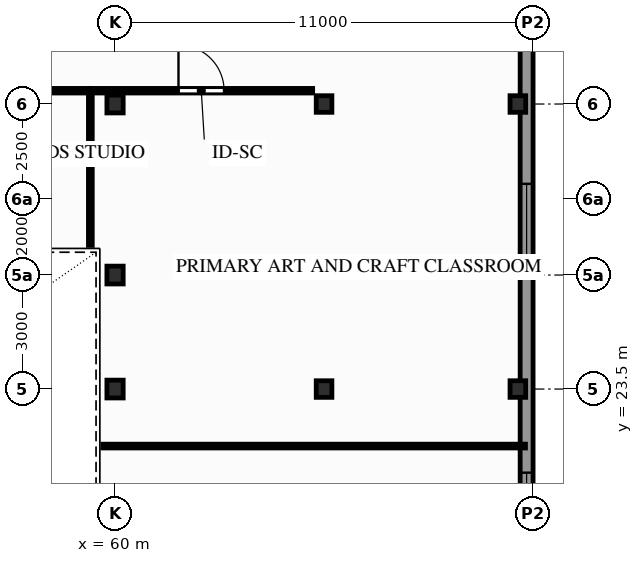
"""IFC4 building model, lengths in metres.
Left out: names, types, materials, properties, quantities, classifications, styles, units other than length and angle.
Written with IfcOpenShell. Run it as: python <this file> out.ifc"""

import sys

from ifc_helpers import new_model, si_unit, direction, frame, frame_2d, origin, origin_2d, place, context, subcontext, project, spatial, rectangle, i_section, extrude, element, fill, save


model = new_model("IFC4")
c1 = context("Model", 3, precision=1e-05, world=origin(), true_north=direction((0.0, 1.0)))
c2 = subcontext(c1, "Body", "Model", "MODEL_VIEW")
j1 = project(units=[si_unit("LENGTHUNIT", "METRE"), si_unit("PLANEANGLEUNIT", "RADIAN")], contexts=[c1])
p1 = place(None, origin())
s1 = spatial("IfcSite", under=j1, at=p1, CompositionType="ELEMENT")
p2 = place(p1, origin())
s2 = spatial("IfcBuilding", under=s1, at=p2, CompositionType="ELEMENT")
p3 = place(p2, frame((0.0, 0.0, 9.0)))
s3 = spatial("IfcBuildingStorey", under=s2, at=p3, CompositionType="ELEMENT", Elevation=9.0)
for number, where, z_axis, x_axis in (
    (1, (60.0, 23.5, 0.0), (0.0, 0.0, 1.0), (1.0, 0.0, 0.0)),
    (2, (60.0, 26.5, 0.0), (0.0, 0.0, 1.0), (1.0, 0.0, 0.0)),
    (3, (60.0, 31.0, 0.0), (0.0, 0.0, 1.0), (1.0, 0.0, 0.0)),
):
    element("IfcColumn", number, at=place(p3, frame(where, z_axis=z_axis, x_axis=x_axis)), inside=s3, PredefinedType="COLUMN", context=c2, shape_type="SweptSolid", body=[
        extrude(i_section(OverallWidth=0.428, OverallDepth=0.469, WebThickness=0.078, FlangeThickness=0.125, FilletRadius=0.015, at=origin_2d()), origin(), (0.0, 0.0, 1.0), 4.5),
    ])
for number, where, z_axis, x_axis in (
    (4, (65.5, 23.5, 0.0), (0.0, 0.0, 1.0), (1.0, 0.0, 0.0)),
    (5, (65.5, 31.0, 0.0), (0.0, 0.0, 1.0), (1.0, 0.0, 0.0)),
    (6, (70.6, 23.5, 0.0), (0.0, 0.0, 1.0), (1.0, 0.0, 0.0)),
    (7, (70.6, 31.0, 0.0), (0.0, 0.0, 1.0), (1.0, 0.0, 0.0)),
):
    element("IfcColumn", number, at=place(p3, frame(where, z_axis=z_axis, x_axis=x_axis)), inside=s3, PredefinedType="COLUMN", context=c2, shape_type="SweptSolid", body=[
        extrude(i_section(OverallWidth=0.412, OverallDepth=0.437, WebThickness=0.036, FlangeThickness=0.058, FilletRadius=0.015, at=origin_2d()), origin(), (0.0, 0.0, 1.0), 4.5),
    ])
p4 = place(p3, frame((70.83, -1.83, 0.0), z_axis=(0.0, 0.0, 1.0), x_axis=(0.0, 1.0, 0.0)))
e8 = element("IfcWall", 8, at=p4, inside=s3, PredefinedType="STANDARD", context=c2, shape_type="SweptSolid", body=[
    extrude(rectangle(XDim=36.43, YDim=0.34, at=frame_2d((18.215, 0.0))), origin(), (0.0, 0.0, 1.0), 3.583),
])
p5 = place(p4, frame((6.33, 0.0, 0.9)))
e9 = element("IfcOpeningElement", 9, at=p5, cuts=e8, PredefinedType="OPENING", context=c2, shape_type="SweptSolid", body=[
    extrude(rectangle(XDim=2.1, YDim=2.05, at=frame_2d((1.05, 1.025))), frame((0.0, 0.18, 0.0), z_axis=(0.0, -1.0, 0.0), x_axis=(1.0, 0.0, 0.0)), (0.0, 0.0, 1.0), 0.36),
])
p6 = place(p4, frame((14.8, 0.0, 0.9)))
e10 = element("IfcOpeningElement", 10, at=p6, cuts=e8, PredefinedType="OPENING", context=c2, shape_type="SweptSolid", body=[
    extrude(rectangle(XDim=2.1, YDim=2.05, at=frame_2d((1.05, 1.025))), frame((0.0, 0.18, 0.0), z_axis=(0.0, -1.0, 0.0), x_axis=(1.0, 0.0, 0.0)), (0.0, 0.0, 1.0), 0.36),
])
p7 = place(p4, frame((21.03, 0.0, 0.9)))
e11 = element("IfcOpeningElement", 11, at=p7, cuts=e8, PredefinedType="OPENING", context=c2, shape_type="SweptSolid", body=[
    extrude(rectangle(XDim=2.1, YDim=2.05, at=frame_2d((1.05, 1.025))), frame((0.0, 0.18, 0.0), z_axis=(0.0, -1.0, 0.0), x_axis=(1.0, 0.0, 0.0)), (0.0, 0.0, 1.0), 0.36),
])
p8 = place(p4, frame((28.63, 0.0, 0.9)))
e12 = element("IfcOpeningElement", 12, at=p8, cuts=e8, PredefinedType="OPENING", context=c2, shape_type="SweptSolid", body=[
    extrude(rectangle(XDim=2.1, YDim=2.05, at=frame_2d((1.05, 1.025))), frame((0.0, 0.18, 0.0), z_axis=(0.0, -1.0, 0.0), x_axis=(1.0, 0.0, 0.0)), (0.0, 0.0, 1.0), 0.36),
])
p9 = place(p3, frame((59.339, 31.35, 0.0), z_axis=(0.0, 0.0, 1.0), x_axis=(1.0, 0.0, 0.0)))
e13 = element("IfcWall", 13, at=p9, inside=s3, PredefinedType="PARTITIONING", context=c2, shape_type="SweptSolid", body=[
    extrude(rectangle(XDim=5.861, YDim=0.12, at=frame_2d((2.931, 0.0))), origin(), (0.0, 0.0, 1.0), 4.22),
])
p10 = place(p9, frame((2.331, 0.0, 0.0)))
e14 = element("IfcOpeningElement", 14, at=p10, cuts=e13, PredefinedType="OPENING", context=c2, shape_type="SweptSolid", body=[
    extrude(rectangle(XDim=1.2, YDim=2.08, at=frame_2d((0.6, 1.04))), frame((0.0, 0.07, 0.0), z_axis=(0.0, -1.0, 0.0), x_axis=(1.0, 0.0, 0.0)), (0.0, 0.0, 1.0), 0.14),
])
p11 = place(p3, frame((38.493, 31.35, 0.0), z_axis=(0.0, 0.0, 1.0), x_axis=(1.0, 0.0, 0.0)))
e15 = element("IfcWall", 15, at=p11, inside=s3, PredefinedType="PARTITIONING", context=c2, shape_type="SweptSolid", body=[
    extrude(rectangle(XDim=20.865, YDim=0.12, at=frame_2d((10.432, 0.0))), origin(), (0.0, 0.0, 1.0), 3.344),
])
p12 = place(p11, frame((10.052, 0.0, 0.0)))
e16 = element("IfcOpeningElement", 16, at=p12, cuts=e15, PredefinedType="OPENING", context=c2, shape_type="SweptSolid", body=[
    extrude(rectangle(XDim=1.2, YDim=2.08, at=frame_2d((0.6, 1.04))), frame((0.0, 0.07, 0.0), z_axis=(0.0, -1.0, 0.0), x_axis=(1.0, 0.0, 0.0)), (0.0, 0.0, 1.0), 0.14),
])
p13 = place(p3, frame((59.68, 22.0, 0.0), z_axis=(0.0, 0.0, 1.0), x_axis=(1.0, 0.0, 0.0)))
e17 = element("IfcWall", 17, at=p13, inside=s3, PredefinedType="PARTITIONING", context=c2, shape_type="SweptSolid", body=[
    extrude(rectangle(XDim=11.12, YDim=0.1, at=frame_2d((5.56, 0.0))), origin(), (0.0, 0.0, 1.0), 3.344),
])
p14 = place(p3, frame((59.35, 27.28, 0.0), z_axis=(0.0, 0.0, 1.0), x_axis=(0.0, 1.0, 0.0)))
e18 = element("IfcWall", 18, at=p14, inside=s3, PredefinedType="PARTITIONING", context=c2, shape_type="SweptSolid", body=[
    extrude(rectangle(XDim=4.066, YDim=0.1, at=frame_2d((2.033, 0.0))), origin(), (0.0, 0.0, 1.0), 3.583),
])
p15 = place(p7, origin())
e19 = element("IfcWindow", 19, at=p15, inside=s3, PartitioningType="SINGLE_PANEL", PredefinedType="WINDOW", context=c2, shape_type="SweptSolid", body=[
    extrude(rectangle(XDim=2.1, YDim=2.05, at=frame_2d((1.05, 1.025))), frame((0.0, 0.03, 0.0), z_axis=(0.0, -1.0, 0.0), x_axis=(1.0, 0.0, 0.0)), (0.0, 0.0, 1.0), 0.06),
])
fill(e11, e19)
p16 = place(p8, origin())
e20 = element("IfcWindow", 20, at=p16, inside=s3, PartitioningType="SINGLE_PANEL", PredefinedType="WINDOW", context=c2, shape_type="SweptSolid", body=[
    extrude(rectangle(XDim=2.1, YDim=2.05, at=frame_2d((1.05, 1.025))), frame((0.0, 0.03, 0.0), z_axis=(0.0, -1.0, 0.0), x_axis=(1.0, 0.0, 0.0)), (0.0, 0.0, 1.0), 0.06),
])
fill(e12, e20)
p17 = place(p10, origin())
e21 = element("IfcDoor", 21, at=p17, inside=s3, OperationType="SINGLE_SWING_LEFT", PredefinedType="DOOR", context=c2, shape_type="SweptSolid", body=[
    extrude(rectangle(XDim=1.2, YDim=2.08, at=frame_2d((0.6, 1.04))), frame((0.0, 0.025, 0.0), z_axis=(0.0, -1.0, 0.0), x_axis=(1.0, 0.0, 0.0)), (0.0, 0.0, 1.0), 0.05),
])
fill(e14, e21)
save(model, sys.argv[1])
